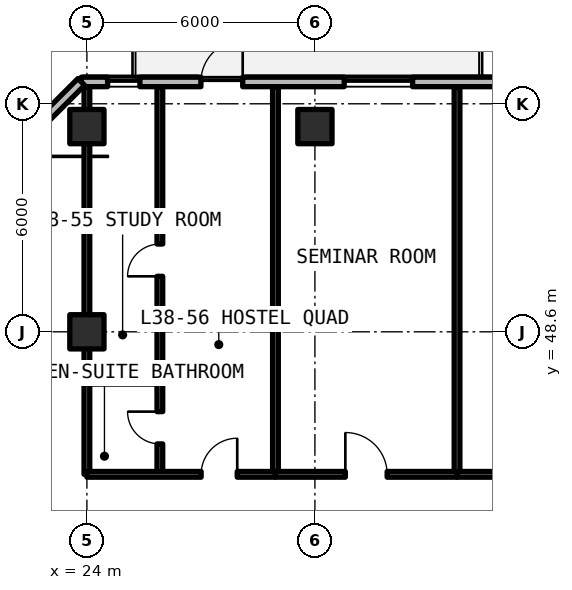
"""IFC4 building model, lengths in metres.
Left out: names, types, materials, properties, quantities, classifications, styles, units other than length and angle.
Written with IfcOpenShell. Run it as: python <this file> out.ifc"""

import sys

from ifc_helpers import new_model, si_unit, direction, frame, frame_2d, origin, origin_2d, place, context, subcontext, project, spatial, rectangle, extrude, element, fill, save


model = new_model("IFC4")
c1 = context("Model", 3, precision=1e-05, world=origin(), true_north=direction((0.0, 1.0)))
c2 = subcontext(c1, "Body", "Model", "MODEL_VIEW")
j1 = project(units=[si_unit("LENGTHUNIT", "METRE"), si_unit("PLANEANGLEUNIT", "RADIAN")], contexts=[c1])
p1 = place(None, origin())
s1 = spatial("IfcSite", under=j1, at=p1, CompositionType="ELEMENT")
p2 = place(p1, origin())
s2 = spatial("IfcBuilding", under=s1, at=p2, CompositionType="ELEMENT")
p3 = place(p2, frame((0.0, 0.0, 138.6)))
s3 = spatial("IfcBuildingStorey", under=s2, at=p3, CompositionType="ELEMENT", Elevation=138.6)
for number, where, z_axis, x_axis in (
    (1, (24.0, 48.6, 0.0), (0.0, 0.0, 1.0), (1.0, 0.0, 0.0)),
    (2, (24.0, 54.0, 0.0), (0.0, 0.0, 1.0), (1.0, 0.0, 0.0)),
    (3, (30.0, 54.0, 0.0), (0.0, 0.0, 1.0), (1.0, 0.0, 0.0)),
):
    element("IfcColumn", number, at=place(p3, frame(where, z_axis=z_axis, x_axis=x_axis)), inside=s3, PredefinedType="COLUMN", context=c2, shape_type="SweptSolid", body=[
        extrude(rectangle(XDim=0.9, YDim=0.9, at=origin_2d()), origin(), (0.0, 0.0, 1.0), 3.3),
    ])
p4 = place(p3, frame((43.475, 55.175, 0.0), z_axis=(0.0, 0.0, 1.0), x_axis=(-1.0, 0.0, 0.0)))
e4 = element("IfcWall", 4, at=p4, inside=s3, PredefinedType="SOLIDWALL", context=c2, shape_type="SweptSolid", body=[
    extrude(rectangle(XDim=19.623, YDim=0.25, at=frame_2d((9.812, 0.0))), origin(), (0.0, 0.0, 1.0), 3.08),
])
p5 = place(p4, frame((15.375, 0.0, 0.0)))
e5 = element("IfcOpeningElement", 5, at=p5, cuts=e4, PredefinedType="OPENING", context=c2, shape_type="SweptSolid", body=[
    extrude(rectangle(XDim=1.1, YDim=2.15, at=frame_2d((0.55, 1.075))), frame((0.0, 0.135, 0.0), z_axis=(0.0, -1.0, 0.0), x_axis=(1.0, 0.0, 0.0)), (0.0, 0.0, 1.0), 0.27),
])
p6 = place(p4, frame((18.08, 0.0, 0.78)))
e6 = element("IfcOpeningElement", 6, at=p6, cuts=e4, PredefinedType="OPENING", context=c2, shape_type="SweptSolid", body=[
    extrude(rectangle(XDim=0.85, YDim=1.65, at=frame_2d((0.425, 0.825))), frame((0.0, 0.135, 0.0), z_axis=(0.0, -1.0, 0.0), x_axis=(1.0, 0.0, 0.0)), (0.0, 0.0, 1.0), 0.27),
])
p7 = place(p4, frame((10.904, 0.0, 0.78)))
e7 = element("IfcOpeningElement", 7, at=p7, cuts=e4, PredefinedType="OPENING", context=c2, shape_type="SweptSolid", body=[
    extrude(rectangle(XDim=1.8, YDim=1.66, at=frame_2d((0.9, 0.83))), frame((0.0, 0.135, 0.0), z_axis=(0.0, -1.0, 0.0), x_axis=(1.0, 0.0, 0.0)), (0.0, 0.0, 1.0), 0.27),
])
p8 = place(p4, frame((5.182, 0.0, 0.78)))
e8 = element("IfcOpeningElement", 8, at=p8, cuts=e4, PredefinedType="OPENING", context=c2, shape_type="SweptSolid", body=[
    extrude(rectangle(XDim=1.4, YDim=1.65, at=frame_2d((0.7, 0.825))), frame((0.0, 0.135, 0.0), z_axis=(0.0, -1.0, 0.0), x_axis=(1.0, 0.0, 0.0)), (0.0, 0.0, 1.0), 0.27),
])
p9 = place(p4, frame((2.392, 0.0, 0.78)))
e9 = element("IfcOpeningElement", 9, at=p9, cuts=e4, PredefinedType="OPENING", context=c2, shape_type="SweptSolid", body=[
    extrude(rectangle(XDim=1.4, YDim=1.65, at=frame_2d((0.7, 0.825))), frame((0.0, 0.135, 0.0), z_axis=(0.0, -1.0, 0.0), x_axis=(1.0, 0.0, 0.0)), (0.0, 0.0, 1.0), 0.27),
])
p10 = place(p3, frame((23.852, 55.175, 0.0), z_axis=(0.0, 0.0, 1.0), x_axis=(-0.70708586489, -0.707127696864, 0.0)))
e10 = element("IfcWall", 10, at=p10, inside=s3, PredefinedType="SOLIDWALL", context=c2, shape_type="SweptSolid", body=[
    extrude(rectangle(XDim=5.836, YDim=0.25, at=frame_2d((2.918, 0.0))), origin(), (0.0, 0.0, 1.0), 3.08),
])
p11 = place(p10, frame((1.538, 0.0, 0.78)))
e11 = element("IfcOpeningElement", 11, at=p11, cuts=e10, PredefinedType="OPENING", context=c2, shape_type="SweptSolid", body=[
    extrude(rectangle(XDim=3.4, YDim=1.66, at=frame_2d((1.7, 0.83))), frame((0.0, 0.135, 0.0), z_axis=(0.0, -1.0, 0.0), x_axis=(1.0, 0.0, 0.0)), (0.0, 0.0, 1.0), 0.27),
])
for number, where, z_axis, x_axis in (
    (12, (24.0, 44.85, 0.0), (0.0, 0.0, 1.0), (0.0, 1.0, 0.0)),
    (13, (28.962, 44.85, 0.0), (0.0, 0.0, 1.0), (0.0, 1.0, 0.0)),
):
    element("IfcWall", number, at=place(p3, frame(where, z_axis=z_axis, x_axis=x_axis)), inside=s3, PredefinedType="SOLIDWALL", context=c2, shape_type="SweptSolid", body=[
        extrude(rectangle(XDim=10.2, YDim=0.15, at=frame_2d((5.1, 0.0))), origin(), (0.0, 0.0, 1.0), 2.35),
    ])
p12 = place(p3, frame((24.0, 47.3, 0.0), z_axis=(0.0, 0.0, 1.0), x_axis=(1.0, 0.0, 0.0)))
e14 = element("IfcWall", 14, at=p12, inside=s3, PredefinedType="PARTITIONING", context=c2, shape_type="SweptSolid", body=[
    extrude(rectangle(XDim=1.92, YDim=0.15, at=frame_2d((0.96, 0.0))), origin(), (0.0, 0.0, 1.0), 2.35),
])
p13 = place(p3, frame((25.92, 44.85, 0.0), z_axis=(0.0, 0.0, 1.0), x_axis=(0.0, 1.0, 0.0)))
e15 = element("IfcWall", 15, at=p13, inside=s3, PredefinedType="PARTITIONING", context=c2, shape_type="SweptSolid", body=[
    extrude(rectangle(XDim=10.2, YDim=0.15, at=frame_2d((5.1, 0.0))), origin(), (0.0, 0.0, 1.0), 2.35),
])
p14 = place(p13, frame((0.8, 0.0, 0.0)))
e16 = element("IfcOpeningElement", 16, at=p14, cuts=e15, PredefinedType="OPENING", context=c2, shape_type="SweptSolid", body=[
    extrude(rectangle(XDim=0.85, YDim=2.1, at=frame_2d((0.425, 1.05))), frame((0.0, 0.085, 0.0), z_axis=(0.0, -1.0, 0.0), x_axis=(1.0, 0.0, 0.0)), (0.0, 0.0, 1.0), 0.17),
])
p15 = place(p13, frame((5.21, 0.0, 0.0)))
e17 = element("IfcOpeningElement", 17, at=p15, cuts=e15, PredefinedType="OPENING", context=c2, shape_type="SweptSolid", body=[
    extrude(rectangle(XDim=0.85, YDim=2.1, at=frame_2d((0.425, 1.05))), frame((0.0, 0.085, 0.0), z_axis=(0.0, -1.0, 0.0), x_axis=(1.0, 0.0, 0.0)), (0.0, 0.0, 1.0), 0.17),
])
p16 = place(p3, frame((24.0, 44.85, 0.0), z_axis=(0.0, 0.0, 1.0), x_axis=(1.0, 0.0, 0.0)))
e18 = element("IfcWall", 18, at=p16, inside=s3, PredefinedType="SOLIDWALL", context=c2, shape_type="SweptSolid", body=[
    extrude(rectangle(XDim=4.962, YDim=0.15, at=frame_2d((2.481, 0.0))), origin(), (0.0, 0.0, 1.0), 2.35),
])
p17 = place(p16, frame((3.006, 0.0, 0.0)))
e19 = element("IfcOpeningElement", 19, at=p17, cuts=e18, PredefinedType="OPENING", context=c2, shape_type="SweptSolid", body=[
    extrude(rectangle(XDim=0.95, YDim=2.15, at=frame_2d((0.475, 1.075))), frame((0.0, 0.085, 0.0), z_axis=(0.0, -1.0, 0.0), x_axis=(1.0, 0.0, 0.0)), (0.0, 0.0, 1.0), 0.17),
])
p18 = place(p3, frame((33.74, 44.85, 0.0), z_axis=(0.0, 0.0, 1.0), x_axis=(0.0, 1.0, 0.0)))
e20 = element("IfcWall", 20, at=p18, inside=s3, PredefinedType="SOLIDWALL", context=c2, shape_type="SweptSolid", body=[
    extrude(rectangle(XDim=10.2, YDim=0.15, at=frame_2d((5.1, 0.0))), origin(), (0.0, 0.0, 1.0), 2.35),
])
p19 = place(p3, frame((28.962, 44.85, 0.0), z_axis=(0.0, 0.0, 1.0), x_axis=(1.0, 0.0, 0.0)))
e21 = element("IfcWall", 21, at=p19, inside=s3, PredefinedType="SOLIDWALL", context=c2, shape_type="SweptSolid", body=[
    extrude(rectangle(XDim=4.778, YDim=0.15, at=frame_2d((2.389, 0.0))), origin(), (0.0, 0.0, 1.0), 2.35),
])
p20 = place(p19, frame((1.839, 0.0, 0.0)))
e22 = element("IfcOpeningElement", 22, at=p20, cuts=e21, PredefinedType="OPENING", context=c2, shape_type="SweptSolid", body=[
    extrude(rectangle(XDim=1.1, YDim=2.15, at=frame_2d((0.55, 1.075))), frame((0.0, 0.085, 0.0), z_axis=(0.0, -1.0, 0.0), x_axis=(1.0, 0.0, 0.0)), (0.0, 0.0, 1.0), 0.17),
])
p21 = place(p3, frame((33.74, 44.85, 0.0), z_axis=(0.0, 0.0, 1.0), x_axis=(1.0, 0.0, 0.0)))
e23 = element("IfcWall", 23, at=p21, inside=s3, PredefinedType="SOLIDWALL", context=c2, shape_type="SweptSolid", body=[
    extrude(rectangle(XDim=5.146, YDim=0.15, at=frame_2d((2.573, 0.0))), origin(), (0.0, 0.0, 1.0), 2.35),
])
p22 = place(p21, frame((2.098, 0.0, 0.0)))
e24 = element("IfcOpeningElement", 24, at=p22, cuts=e23, PredefinedType="OPENING", context=c2, shape_type="SweptSolid", body=[
    extrude(rectangle(XDim=0.95, YDim=2.15, at=frame_2d((0.475, 1.075))), frame((0.0, 0.085, 0.0), z_axis=(0.0, -1.0, 0.0), x_axis=(1.0, 0.0, 0.0)), (0.0, 0.0, 1.0), 0.17),
])
p23 = place(p5, frame((1.1, 0.0, 0.0), z_axis=(0.0, 0.0, 1.0), x_axis=(-1.0, 0.0, 0.0)))
e25 = element("IfcDoor", 25, at=p23, inside=s3, OperationType="SINGLE_SWING_RIGHT", PredefinedType="DOOR", context=c2, shape_type="SweptSolid", body=[
    extrude(rectangle(XDim=1.1, YDim=2.15, at=frame_2d((0.55, 1.075))), frame((0.0, 0.025, 0.0), z_axis=(0.0, -1.0, 0.0), x_axis=(1.0, 0.0, 0.0)), (0.0, 0.0, 1.0), 0.05),
])
fill(e5, e25)
p24 = place(p6, origin())
e26 = element("IfcWindow", 26, at=p24, inside=s3, PartitioningType="SINGLE_PANEL", PredefinedType="WINDOW", context=c2, shape_type="SweptSolid", body=[
    extrude(rectangle(XDim=0.85, YDim=1.65, at=frame_2d((0.425, 0.825))), frame((0.0, 0.03, 0.0), z_axis=(0.0, -1.0, 0.0), x_axis=(1.0, 0.0, 0.0)), (0.0, 0.0, 1.0), 0.06),
])
fill(e6, e26)
p25 = place(p7, origin())
e27 = element("IfcWindow", 27, at=p25, inside=s3, PartitioningType="SINGLE_PANEL", PredefinedType="WINDOW", context=c2, shape_type="SweptSolid", body=[
    extrude(rectangle(XDim=1.8, YDim=1.66, at=frame_2d((0.9, 0.83))), frame((0.0, 0.03, 0.0), z_axis=(0.0, -1.0, 0.0), x_axis=(1.0, 0.0, 0.0)), (0.0, 0.0, 1.0), 0.06),
])
fill(e7, e27)
p26 = place(p14, origin())
e28 = element("IfcDoor", 28, at=p26, inside=s3, OperationType="SINGLE_SWING_RIGHT", PredefinedType="DOOR", context=c2, shape_type="SweptSolid", body=[
    extrude(rectangle(XDim=0.85, YDim=2.1, at=frame_2d((0.425, 1.05))), frame((0.0, 0.025, 0.0), z_axis=(0.0, -1.0, 0.0), x_axis=(1.0, 0.0, 0.0)), (0.0, 0.0, 1.0), 0.05),
])
fill(e16, e28)
p27 = place(p15, origin())
e29 = element("IfcDoor", 29, at=p27, inside=s3, OperationType="SINGLE_SWING_LEFT", PredefinedType="DOOR", context=c2, shape_type="SweptSolid", body=[
    extrude(rectangle(XDim=0.85, YDim=2.1, at=frame_2d((0.425, 1.05))), frame((0.0, 0.025, 0.0), z_axis=(0.0, -1.0, 0.0), x_axis=(1.0, 0.0, 0.0)), (0.0, 0.0, 1.0), 0.05),
])
fill(e17, e29)
p28 = place(p17, origin())
e30 = element("IfcDoor", 30, at=p28, inside=s3, OperationType="SINGLE_SWING_RIGHT", PredefinedType="DOOR", context=c2, shape_type="SweptSolid", body=[
    extrude(rectangle(XDim=0.95, YDim=2.15, at=frame_2d((0.475, 1.075))), frame((0.0, 0.025, 0.0), z_axis=(0.0, -1.0, 0.0), x_axis=(1.0, 0.0, 0.0)), (0.0, 0.0, 1.0), 0.05),
])
fill(e19, e30)
p29 = place(p20, origin())
e31 = element("IfcDoor", 31, at=p29, inside=s3, OperationType="SINGLE_SWING_LEFT", PredefinedType="DOOR", context=c2, shape_type="SweptSolid", body=[
    extrude(rectangle(XDim=1.1, YDim=2.15, at=frame_2d((0.55, 1.075))), frame((0.0, 0.025, 0.0), z_axis=(0.0, -1.0, 0.0), x_axis=(1.0, 0.0, 0.0)), (0.0, 0.0, 1.0), 0.05),
])
fill(e22, e31)
save(model, sys.argv[1])
